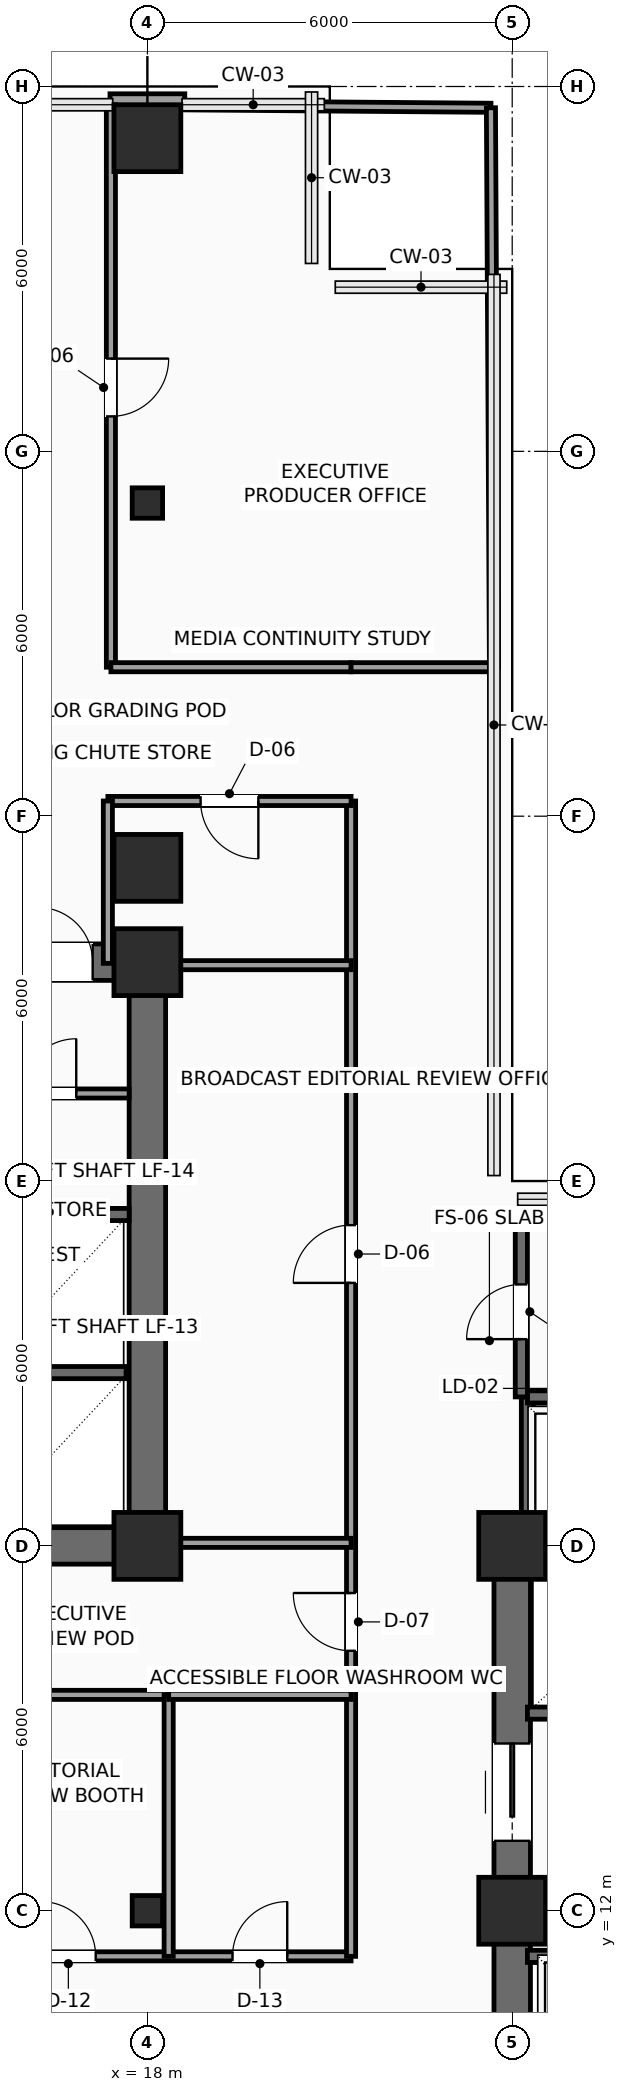
"""IFC4 building model, lengths in metres.
Left out: names, types, materials, properties, quantities, classifications, styles, units other than length and angle.
Written with IfcOpenShell. Run it as: python <this file> out.ifc"""

import sys

from ifc_helpers import new_model, si_unit, direction, frame, frame_2d, origin, origin_2d, place, context, subcontext, project, spatial, rectangle, hollow_rectangle, extrude, element, fill, save


model = new_model("IFC4")
c1 = context("Model", 3, precision=1e-05, world=origin(), true_north=direction((0.0, 1.0)))
c2 = subcontext(c1, "Body", "Model", "MODEL_VIEW")
j1 = project(units=[si_unit("LENGTHUNIT", "METRE"), si_unit("PLANEANGLEUNIT", "RADIAN")], contexts=[c1])
p1 = place(None, origin())
s1 = spatial("IfcSite", under=j1, at=p1, CompositionType="ELEMENT")
p2 = place(p1, origin())
s2 = spatial("IfcBuilding", under=s1, at=p2, CompositionType="ELEMENT")
p3 = place(p2, frame((0.0, 0.0, 156.9)))
s3 = spatial("IfcBuildingStorey", under=s2, at=p3, CompositionType="ELEMENT", Elevation=156.9)
for number, where, z_axis, x_axis in (
    (1, (18.0, 18.0, 0.0), (0.0, 0.0, 1.0), (1.0, 0.0, 0.0)),
    (2, (18.0, 27.6, 0.0), (0.0, 0.0, 1.0), (1.0, 0.0, 0.0)),
    (3, (24.0, 12.0, 0.0), (0.0, 0.0, 1.0), (1.0, 0.0, 0.0)),
    (4, (24.0, 18.0, 0.0), (0.0, 0.0, 1.0), (1.0, 0.0, 0.0)),
):
    element("IfcColumn", number, at=place(p3, frame(where, z_axis=z_axis, x_axis=x_axis)), inside=s3, PredefinedType="COLUMN", context=c2, shape_type="SweptSolid", body=[
        extrude(rectangle(XDim=1.1, YDim=1.1, at=origin_2d()), origin(), (0.0, 0.0, 1.0), 3.75),
    ])
p4 = place(p3, frame((18.0, 12.0, 0.0), z_axis=(0.0, 0.0, 1.0), x_axis=(1.0, 0.0, 0.0)))
e5 = element("IfcColumn", 5, at=p4, inside=s3, PredefinedType="COLUMN", context=c2, shape_type="SweptSolid", body=[
    extrude(hollow_rectangle(XDim=0.5, YDim=0.5, WallThickness=0.025, InnerFilletRadius=0.025, OuterFilletRadius=0.04, at=origin_2d()), origin(), (0.0, 0.0, 1.0), 3.75),
])
p5 = place(p3, frame((18.0, 29.15, 0.0), z_axis=(0.0, 0.0, 1.0), x_axis=(1.0, 0.0, 0.0)))
e6 = element("IfcColumn", 6, at=p5, inside=s3, PredefinedType="COLUMN", context=c2, shape_type="SweptSolid", body=[
    extrude(rectangle(XDim=1.1, YDim=1.1, at=origin_2d()), origin(), (0.0, 0.0, 1.0), 3.75),
])
p6 = place(p3, frame((18.0, 35.15, 0.0), z_axis=(0.0, 0.0, 1.0), x_axis=(1.0, 0.0, 0.0)))
e7 = element("IfcColumn", 7, at=p6, inside=s3, PredefinedType="COLUMN", context=c2, shape_type="SweptSolid", body=[
    extrude(hollow_rectangle(XDim=0.5, YDim=0.5, WallThickness=0.025, InnerFilletRadius=0.025, OuterFilletRadius=0.04, at=origin_2d()), origin(), (0.0, 0.0, 1.0), 3.75),
])
p7 = place(p3, frame((18.0, 41.15, 0.0), z_axis=(0.0, 0.0, 1.0), x_axis=(1.0, 0.0, 0.0)))
e8 = element("IfcColumn", 8, at=p7, inside=s3, PredefinedType="COLUMN", context=c2, shape_type="SweptSolid", body=[
    extrude(rectangle(XDim=1.1, YDim=1.1, at=origin_2d()), origin(), (0.0, 0.0, 1.0), 3.75),
])
p8 = place(p3, frame((17.385, 41.76, 0.0), z_axis=(0.0, 0.0, 1.0), x_axis=(1.0, 0.0, 0.0)))
e9 = element("IfcWall", 9, at=p8, inside=s3, PredefinedType="SOLIDWALL", context=c2, shape_type="SweptSolid", body=[
    extrude(rectangle(XDim=1.23, YDim=0.24, at=frame_2d((0.615, 0.0))), origin(), (0.0, 0.0, 1.0), 3.525),
])
p9 = place(p3, frame((6.0, 18.0, 0.0), z_axis=(0.0, 0.0, 1.0), x_axis=(1.0, 0.0, 0.0)))
e10 = element("IfcWall", 10, at=p9, inside=s3, PredefinedType="SHEAR", context=c2, shape_type="SweptSolid", body=[
    extrude(rectangle(XDim=12.0, YDim=0.6, at=frame_2d((6.0, 0.0))), origin(), (0.0, 0.0, 1.0), 3.525),
])
p10 = place(p9, frame((7.15, 0.0, 0.0)))
e11 = element("IfcOpeningElement", 11, at=p10, cuts=e10, PredefinedType="OPENING", context=c2, shape_type="SweptSolid", body=[
    extrude(rectangle(XDim=1.6, YDim=2.3, at=frame_2d((0.8, 1.15))), frame((0.0, 0.31, 0.0), z_axis=(0.0, -1.0, 0.0), x_axis=(1.0, 0.0, 0.0)), (0.0, 0.0, 1.0), 0.62),
])
p11 = place(p3, frame((6.0, 27.6, 0.0), z_axis=(0.0, 0.0, 1.0), x_axis=(1.0, 0.0, 0.0)))
e12 = element("IfcWall", 12, at=p11, inside=s3, PredefinedType="SHEAR", context=c2, shape_type="SweptSolid", body=[
    extrude(rectangle(XDim=12.0, YDim=0.6, at=frame_2d((6.0, 0.0))), origin(), (0.0, 0.0, 1.0), 3.525),
])
p12 = place(p11, frame((10.2, 0.0, 0.0)))
e13 = element("IfcOpeningElement", 13, at=p12, cuts=e12, PredefinedType="OPENING", context=c2, shape_type="SweptSolid", body=[
    extrude(rectangle(XDim=0.9, YDim=2.15, at=frame_2d((0.45, 1.075))), frame((0.0, 0.31, 0.0), z_axis=(0.0, -1.0, 0.0), x_axis=(1.0, 0.0, 0.0)), (0.0, 0.0, 1.0), 0.62),
])
for number, where, z_axis, x_axis in (
    (14, (18.0, 18.0, 0.0), (0.0, 0.0, 1.0), (0.0, 1.0, 0.0)),
    (15, (24.0, 18.0, 0.0), (0.0, 0.0, 1.0), (1.0, 0.0, 0.0)),
):
    element("IfcWall", number, at=place(p3, frame(where, z_axis=z_axis, x_axis=x_axis)), inside=s3, PredefinedType="SHEAR", context=c2, shape_type="SweptSolid", body=[
        extrude(rectangle(XDim=9.6, YDim=0.6, at=frame_2d((4.8, 0.0))), origin(), (0.0, 0.0, 1.0), 3.525),
    ])
p13 = place(p3, frame((24.0, 6.0, 0.0), z_axis=(0.0, 0.0, 1.0), x_axis=(0.0, 1.0, 0.0)))
e16 = element("IfcWall", 16, at=p13, inside=s3, PredefinedType="SHEAR", context=c2, shape_type="SweptSolid", body=[
    extrude(rectangle(XDim=12.0, YDim=0.6, at=frame_2d((6.0, 0.0))), origin(), (0.0, 0.0, 1.0), 3.525),
])
p14 = place(p13, frame((7.15, 0.0, 0.0)))
e17 = element("IfcOpeningElement", 17, at=p14, cuts=e16, PredefinedType="OPENING", context=c2, shape_type="SweptSolid", body=[
    extrude(rectangle(XDim=1.6, YDim=2.3, at=frame_2d((0.8, 1.15))), frame((0.0, 0.31, 0.0), z_axis=(0.0, -1.0, 0.0), x_axis=(1.0, 0.0, 0.0)), (0.0, 0.0, 1.0), 0.62),
])
p15 = place(p3, frame((24.25, 11.25, 0.0), z_axis=(0.0, 0.0, 1.0), x_axis=(1.0, 0.0, 0.0)))
e18 = element("IfcWall", 18, at=p15, inside=s3, PredefinedType="SHEAR", context=c2, shape_type="SweptSolid", body=[
    extrude(rectangle(XDim=2.17, YDim=0.2, at=frame_2d((1.085, 0.0))), origin(), (0.0, 0.0, 1.0), 3.525),
])
p16 = place(p3, frame((15.25, 20.85, 0.0), z_axis=(0.0, 0.0, 1.0), x_axis=(1.0, 0.0, 0.0)))
e19 = element("IfcWall", 19, at=p16, inside=s3, PredefinedType="SHEAR", context=c2, shape_type="SweptSolid", body=[
    extrude(rectangle(XDim=2.4, YDim=0.2, at=frame_2d((1.2, 0.0))), origin(), (0.0, 0.0, 1.0), 3.525),
])
p17 = place(p3, frame((15.25, 23.45, 0.0), z_axis=(0.0, 0.0, 1.0), x_axis=(1.0, 0.0, 0.0)))
e20 = element("IfcWall", 20, at=p17, inside=s3, PredefinedType="SHEAR", context=c2, shape_type="SweptSolid", body=[
    extrude(rectangle(XDim=2.45, YDim=0.2, at=frame_2d((1.225, 0.0))), origin(), (0.0, 0.0, 1.0), 3.525),
])
p18 = place(p3, frame((24.25, 15.25, 0.0), z_axis=(0.0, 0.0, 1.0), x_axis=(1.0, 0.0, 0.0)))
e21 = element("IfcWall", 21, at=p18, inside=s3, PredefinedType="SHEAR", context=c2, shape_type="SweptSolid", body=[
    extrude(rectangle(XDim=5.2, YDim=0.2, at=frame_2d((2.6, 0.0))), origin(), (0.0, 0.0, 1.0), 3.525),
])
p19 = place(p3, frame((15.28, 25.44, 0.0), z_axis=(0.0, 0.0, 1.0), x_axis=(1.0, 0.0, 0.0)))
e22 = element("IfcWall", 22, at=p19, inside=s3, PredefinedType="PARTITIONING", context=c2, shape_type="SweptSolid", body=[
    extrude(rectangle(XDim=2.42, YDim=0.15, at=frame_2d((1.21, 0.0))), origin(), (0.0, 0.0, 1.0), 3.525),
])
p20 = place(p19, frame((0.65, 0.0, 0.0)))
e23 = element("IfcOpeningElement", 23, at=p20, cuts=e22, PredefinedType="OPENING", context=c2, shape_type="SweptSolid", body=[
    extrude(rectangle(XDim=0.9, YDim=2.15, at=frame_2d((0.45, 1.075))), frame((0.0, 0.085, 0.0), z_axis=(0.0, -1.0, 0.0), x_axis=(1.0, 0.0, 0.0)), (0.0, 0.0, 1.0), 0.17),
])
p21 = place(p3, frame((24.25, 18.1, 0.0), z_axis=(0.0, 0.0, 1.0), x_axis=(0.0, 1.0, 0.0)))
e24 = element("IfcWall", 24, at=p21, inside=s3, PredefinedType="SHEAR", context=c2, shape_type="SweptSolid", body=[
    extrude(rectangle(XDim=2.35, YDim=0.2, at=frame_2d((1.175, 0.0))), origin(), (0.0, 0.0, 1.0), 3.525),
])
p22 = place(p3, frame((24.25, 20.45, 0.0), z_axis=(0.0, 0.0, 1.0), x_axis=(1.0, 0.0, 0.0)))
e25 = element("IfcWall", 25, at=p22, inside=s3, PredefinedType="SHEAR", context=c2, shape_type="SweptSolid", body=[
    extrude(rectangle(XDim=9.05, YDim=0.2, at=frame_2d((4.525, 0.0))), origin(), (0.0, 0.0, 1.0), 3.525),
])
p23 = place(p22, frame((0.4, 0.0, 0.0)))
e26 = element("IfcOpeningElement", 26, at=p23, cuts=e25, PredefinedType="OPENING", context=c2, shape_type="SweptSolid", body=[
    extrude(rectangle(XDim=1.2, YDim=2.2, at=frame_2d((0.6, 1.1))), frame((0.0, 0.11, 0.0), z_axis=(0.0, -1.0, 0.0), x_axis=(1.0, 0.0, 0.0)), (0.0, 0.0, 1.0), 0.22),
])
p24 = place(p22, frame((2.65, 0.0, 0.0)))
e27 = element("IfcOpeningElement", 27, at=p24, cuts=e25, PredefinedType="OPENING", context=c2, shape_type="SweptSolid", body=[
    extrude(rectangle(XDim=1.2, YDim=2.2, at=frame_2d((0.6, 1.1))), frame((0.0, 0.11, 0.0), z_axis=(0.0, -1.0, 0.0), x_axis=(1.0, 0.0, 0.0)), (0.0, 0.0, 1.0), 0.22),
])
p25 = place(p22, frame((4.9, 0.0, 0.0)))
e28 = element("IfcOpeningElement", 28, at=p25, cuts=e25, PredefinedType="OPENING", context=c2, shape_type="SweptSolid", body=[
    extrude(rectangle(XDim=1.2, YDim=2.2, at=frame_2d((0.6, 1.1))), frame((0.0, 0.11, 0.0), z_axis=(0.0, -1.0, 0.0), x_axis=(1.0, 0.0, 0.0)), (0.0, 0.0, 1.0), 0.22),
])
p26 = place(p22, frame((7.15, 0.0, 0.0)))
e29 = element("IfcOpeningElement", 29, at=p26, cuts=e25, PredefinedType="OPENING", context=c2, shape_type="SweptSolid", body=[
    extrude(rectangle(XDim=1.2, YDim=2.2, at=frame_2d((0.6, 1.1))), frame((0.0, 0.11, 0.0), z_axis=(0.0, -1.0, 0.0), x_axis=(1.0, 0.0, 0.0)), (0.0, 0.0, 1.0), 0.22),
])
p27 = place(p3, frame((24.15, 23.5, 0.0), z_axis=(0.0, 0.0, 1.0), x_axis=(1.0, 0.0, 0.0)))
e30 = element("IfcWall", 30, at=p27, inside=s3, PredefinedType="SHEAR", context=c2, shape_type="SweptSolid", body=[
    extrude(rectangle(XDim=9.15, YDim=0.2, at=frame_2d((4.575, 0.0))), origin(), (0.0, 0.0, 1.0), 3.525),
])
p28 = place(p3, frame((24.15, 20.45, 0.0), z_axis=(0.0, 0.0, 1.0), x_axis=(0.0, 1.0, 0.0)))
e31 = element("IfcWall", 31, at=p28, inside=s3, PredefinedType="SHEAR", context=c2, shape_type="SweptSolid", body=[
    extrude(rectangle(XDim=3.05, YDim=0.2, at=frame_2d((1.525, 0.0))), origin(), (0.0, 0.0, 1.0), 3.525),
])
p29 = place(p28, frame((0.95, 0.0, 0.0)))
e32 = element("IfcOpeningElement", 32, at=p29, cuts=e31, PredefinedType="OPENING", context=c2, shape_type="SweptSolid", body=[
    extrude(rectangle(XDim=0.9, YDim=2.15, at=frame_2d((0.45, 1.075))), frame((0.0, 0.11, 0.0), z_axis=(0.0, -1.0, 0.0), x_axis=(1.0, 0.0, 0.0)), (0.0, 0.0, 1.0), 0.22),
])
p30 = place(p3, frame((10.8, 11.25, 0.0), z_axis=(0.0, 0.0, 1.0), x_axis=(1.0, 0.0, 0.0)))
e33 = element("IfcWall", 33, at=p30, inside=s3, PredefinedType="PARTITIONING", context=c2, shape_type="SweptSolid", body=[
    extrude(rectangle(XDim=10.55, YDim=0.15, at=frame_2d((5.275, 0.0))), origin(), (0.0, 0.0, 1.0), 3.525),
])
p31 = place(p30, frame((1.98, 0.0, 0.0)))
e34 = element("IfcOpeningElement", 34, at=p31, cuts=e33, PredefinedType="OPENING", context=c2, shape_type="SweptSolid", body=[
    extrude(rectangle(XDim=0.95, YDim=2.15, at=frame_2d((0.475, 1.075))), frame((0.0, 0.085, 0.0), z_axis=(0.0, -1.0, 0.0), x_axis=(1.0, 0.0, 0.0)), (0.0, 0.0, 1.0), 0.17),
])
p32 = place(p30, frame((5.45, 0.0, 0.0)))
e35 = element("IfcOpeningElement", 35, at=p32, cuts=e33, PredefinedType="OPENING", context=c2, shape_type="SweptSolid", body=[
    extrude(rectangle(XDim=0.9, YDim=2.1, at=frame_2d((0.45, 1.05))), frame((0.0, 0.085, 0.0), z_axis=(0.0, -1.0, 0.0), x_axis=(1.0, 0.0, 0.0)), (0.0, 0.0, 1.0), 0.17),
])
p33 = place(p30, frame((8.6, 0.0, 0.0)))
e36 = element("IfcOpeningElement", 36, at=p33, cuts=e33, PredefinedType="OPENING", context=c2, shape_type="SweptSolid", body=[
    extrude(rectangle(XDim=0.9, YDim=2.1, at=frame_2d((0.45, 1.05))), frame((0.0, 0.085, 0.0), z_axis=(0.0, -1.0, 0.0), x_axis=(1.0, 0.0, 0.0)), (0.0, 0.0, 1.0), 0.17),
])
p34 = place(p3, frame((21.35, 11.25, 0.0), z_axis=(0.0, 0.0, 1.0), x_axis=(0.0, 1.0, 0.0)))
e37 = element("IfcWall", 37, at=p34, inside=s3, PredefinedType="PARTITIONING", context=c2, shape_type="SweptSolid", body=[
    extrude(rectangle(XDim=19.0, YDim=0.15, at=frame_2d((9.5, 0.0))), origin(), (0.0, 0.0, 1.0), 3.525),
])
p35 = place(p34, frame((11.075, 0.0, 0.0)))
e38 = element("IfcOpeningElement", 38, at=p35, cuts=e37, PredefinedType="OPENING", context=c2, shape_type="SweptSolid", body=[
    extrude(rectangle(XDim=0.95, YDim=2.15, at=frame_2d((0.475, 1.075))), frame((0.0, 0.085, 0.0), z_axis=(0.0, -1.0, 0.0), x_axis=(1.0, 0.0, 0.0)), (0.0, 0.0, 1.0), 0.17),
])
p36 = place(p34, frame((5.025, 0.0, 0.0)))
e39 = element("IfcOpeningElement", 39, at=p36, cuts=e37, PredefinedType="OPENING", context=c2, shape_type="SweptSolid", body=[
    extrude(rectangle(XDim=0.95, YDim=2.15, at=frame_2d((0.475, 1.075))), frame((0.0, 0.085, 0.0), z_axis=(0.0, -1.0, 0.0), x_axis=(1.0, 0.0, 0.0)), (0.0, 0.0, 1.0), 0.17),
])
p37 = place(p3, frame((21.35, 30.25, 0.0), z_axis=(0.0, 0.0, 1.0), x_axis=(-1.0, 0.0, 0.0)))
e40 = element("IfcWall", 40, at=p37, inside=s3, PredefinedType="PARTITIONING", context=c2, shape_type="SweptSolid", body=[
    extrude(rectangle(XDim=4.0, YDim=0.15, at=frame_2d((2.0, 0.0))), origin(), (0.0, 0.0, 1.0), 3.525),
])
p38 = place(p37, frame((1.525, 0.0, 0.0)))
e41 = element("IfcOpeningElement", 41, at=p38, cuts=e40, PredefinedType="OPENING", context=c2, shape_type="SweptSolid", body=[
    extrude(rectangle(XDim=0.95, YDim=2.15, at=frame_2d((0.475, 1.075))), frame((0.0, 0.085, 0.0), z_axis=(0.0, -1.0, 0.0), x_axis=(1.0, 0.0, 0.0)), (0.0, 0.0, 1.0), 0.17),
])
p39 = place(p3, frame((17.35, 30.25, 0.0), z_axis=(0.0, 0.0, 1.0), x_axis=(0.0, -1.0, 0.0)))
e42 = element("IfcWall", 42, at=p39, inside=s3, PredefinedType="PARTITIONING", context=c2, shape_type="SweptSolid", body=[
    extrude(rectangle(XDim=2.67, YDim=0.15, at=frame_2d((1.335, 0.0))), origin(), (0.0, 0.0, 1.0), 3.525),
])
p40 = place(p3, frame((17.4, 41.7, 0.0), z_axis=(0.0, 0.0, 1.0), x_axis=(0.0, -1.0, 0.0)))
e43 = element("IfcWall", 43, at=p40, inside=s3, PredefinedType="PARTITIONING", context=c2, shape_type="SweptSolid", body=[
    extrude(rectangle(XDim=9.25, YDim=0.15, at=frame_2d((4.625, 0.0))), origin(), (0.0, 0.0, 1.0), 3.525),
])
p41 = place(p40, frame((4.175, 0.0, 0.0)))
e44 = element("IfcOpeningElement", 44, at=p41, cuts=e43, PredefinedType="OPENING", context=c2, shape_type="SweptSolid", body=[
    extrude(rectangle(XDim=0.95, YDim=2.15, at=frame_2d((0.475, 1.075))), frame((0.0, 0.085, 0.0), z_axis=(0.0, -1.0, 0.0), x_axis=(1.0, 0.0, 0.0)), (0.0, 0.0, 1.0), 0.17),
])
p42 = place(p3, frame((17.4, 32.45, 0.0), z_axis=(0.0, 0.0, 1.0), x_axis=(1.0, 0.0, 0.0)))
e45 = element("IfcWall", 45, at=p42, inside=s3, PredefinedType="PARTITIONING", context=c2, shape_type="SweptSolid", body=[
    extrude(rectangle(XDim=3.95, YDim=0.15, at=frame_2d((1.975, 0.0))), origin(), (0.0, 0.0, 1.0), 3.525),
])
p43 = place(p3, frame((21.35, 32.45, 0.0), z_axis=(0.0, 0.0, 1.0), x_axis=(1.0, 0.0, 0.0)))
e46 = element("IfcWall", 46, at=p43, inside=s3, PredefinedType="PARTITIONING", context=c2, shape_type="SweptSolid", body=[
    extrude(rectangle(XDim=2.35, YDim=0.15, at=frame_2d((1.175, 0.0))), origin(), (0.0, 0.0, 1.0), 3.525),
])
p44 = place(p3, frame((15.2, 15.55, 0.0), z_axis=(0.0, 0.0, 1.0), x_axis=(1.0, 0.0, 0.0)))
e47 = element("IfcWall", 47, at=p44, inside=s3, PredefinedType="PARTITIONING", context=c2, shape_type="SweptSolid", body=[
    extrude(rectangle(XDim=3.15, YDim=0.15, at=frame_2d((1.575, 0.0))), origin(), (0.0, 0.0, 1.0), 3.525),
])
p45 = place(p3, frame((18.35, 11.25, 0.0), z_axis=(0.0, 0.0, 1.0), x_axis=(0.0, 1.0, 0.0)))
e48 = element("IfcWall", 48, at=p45, inside=s3, PredefinedType="PARTITIONING", context=c2, shape_type="SweptSolid", body=[
    extrude(rectangle(XDim=4.3, YDim=0.15, at=frame_2d((2.15, 0.0))), origin(), (0.0, 0.0, 1.0), 3.525),
])
p46 = place(p3, frame((18.35, 15.55, 0.0), z_axis=(0.0, 0.0, 1.0), x_axis=(1.0, 0.0, 0.0)))
e49 = element("IfcWall", 49, at=p46, inside=s3, PredefinedType="PARTITIONING", context=c2, shape_type="SweptSolid", body=[
    extrude(rectangle(XDim=3.0, YDim=0.15, at=frame_2d((1.5, 0.0))), origin(), (0.0, 0.0, 1.0), 3.525),
])
p47 = place(p3, frame((18.1, 18.05, 0.0), z_axis=(0.0, 0.0, 1.0), x_axis=(1.0, 0.0, 0.0)))
e50 = element("IfcWall", 50, at=p47, inside=s3, PredefinedType="PARTITIONING", context=c2, shape_type="SweptSolid", body=[
    extrude(rectangle(XDim=3.25, YDim=0.15, at=frame_2d((1.625, 0.0))), origin(), (0.0, 0.0, 1.0), 3.017),
])
p48 = place(p3, frame((18.1, 27.55, 0.0), z_axis=(0.0, 0.0, 1.0), x_axis=(1.0, 0.0, 0.0)))
e51 = element("IfcWall", 51, at=p48, inside=s3, PredefinedType="PARTITIONING", context=c2, shape_type="SweptSolid", body=[
    extrude(rectangle(XDim=3.25, YDim=0.15, at=frame_2d((1.625, 0.0))), origin(), (0.0, 0.0, 1.0), 3.525),
])
p49 = place(p3, frame((18.615, 41.69, 0.0), z_axis=(0.0, 0.0, 1.0), x_axis=(0.99996799533, -0.008000519771, 0.0)))
e52 = element("IfcWall", 52, at=p49, inside=s3, PredefinedType="PARTITIONING", context=c2, shape_type="SweptSolid", body=[
    extrude(rectangle(XDim=5.035, YDim=0.15, at=frame_2d((2.518, 0.0))), origin(), (0.0, 0.0, 1.0), 3.525),
])
p50 = place(p3, frame((23.7, 32.45, 0.0), z_axis=(0.0, 0.0, 1.0), x_axis=(-0.005440038388, 0.999985202882, 0.0)))
e53 = element("IfcWall", 53, at=p50, inside=s3, PredefinedType="PARTITIONING", context=c2, shape_type="SweptSolid", body=[
    extrude(rectangle(XDim=9.2, YDim=0.15, at=frame_2d((4.6, 0.0))), origin(), (0.0, 0.0, 1.0), 3.525),
])
p51 = place(p12, origin())
e54 = element("IfcDoor", 54, at=p51, inside=s3, OperationType="SINGLE_SWING_LEFT", PredefinedType="DOOR", context=c2, shape_type="SweptSolid", body=[
    extrude(rectangle(XDim=0.9, YDim=2.15, at=frame_2d((0.45, 1.075))), frame((0.0, 0.025, 0.0), z_axis=(0.0, -1.0, 0.0), x_axis=(1.0, 0.0, 0.0)), (0.0, 0.0, 1.0), 0.05),
])
fill(e13, e54)
p52 = place(p14, origin())
e55 = element("IfcDoor", 55, at=p52, inside=s3, OperationType="DOUBLE_DOOR_SLIDING", PredefinedType="DOOR", context=c2, shape_type="SweptSolid", body=[
    extrude(rectangle(XDim=1.6, YDim=2.3, at=frame_2d((0.8, 1.15))), frame((0.0, 0.025, 0.0), z_axis=(0.0, -1.0, 0.0), x_axis=(1.0, 0.0, 0.0)), (0.0, 0.0, 1.0), 0.05),
])
fill(e17, e55)
p53 = place(p20, origin())
e56 = element("IfcDoor", 56, at=p53, inside=s3, OperationType="SINGLE_SWING_RIGHT", PredefinedType="DOOR", context=c2, shape_type="SweptSolid", body=[
    extrude(rectangle(XDim=0.9, YDim=2.15, at=frame_2d((0.45, 1.075))), frame((0.0, 0.025, 0.0), z_axis=(0.0, -1.0, 0.0), x_axis=(1.0, 0.0, 0.0)), (0.0, 0.0, 1.0), 0.05),
])
fill(e23, e56)
p54 = place(p29, origin())
e57 = element("IfcDoor", 57, at=p54, inside=s3, OperationType="SINGLE_SWING_LEFT", PredefinedType="DOOR", context=c2, shape_type="SweptSolid", body=[
    extrude(rectangle(XDim=0.9, YDim=2.15, at=frame_2d((0.45, 1.075))), frame((0.0, 0.025, 0.0), z_axis=(0.0, -1.0, 0.0), x_axis=(1.0, 0.0, 0.0)), (0.0, 0.0, 1.0), 0.05),
])
fill(e32, e57)
p55 = place(p32, origin())
e58 = element("IfcDoor", 58, at=p55, inside=s3, OperationType="SINGLE_SWING_LEFT", PredefinedType="DOOR", context=c2, shape_type="SweptSolid", body=[
    extrude(rectangle(XDim=0.9, YDim=2.1, at=frame_2d((0.45, 1.05))), frame((0.0, 0.025, 0.0), z_axis=(0.0, -1.0, 0.0), x_axis=(1.0, 0.0, 0.0)), (0.0, 0.0, 1.0), 0.05),
])
fill(e35, e58)
p56 = place(p33, origin())
e59 = element("IfcDoor", 59, at=p56, inside=s3, OperationType="SINGLE_SWING_RIGHT", PredefinedType="DOOR", context=c2, shape_type="SweptSolid", body=[
    extrude(rectangle(XDim=0.9, YDim=2.1, at=frame_2d((0.45, 1.05))), frame((0.0, 0.025, 0.0), z_axis=(0.0, -1.0, 0.0), x_axis=(1.0, 0.0, 0.0)), (0.0, 0.0, 1.0), 0.05),
])
fill(e36, e59)
p57 = place(p35, origin())
e60 = element("IfcDoor", 60, at=p57, inside=s3, OperationType="SINGLE_SWING_LEFT", PredefinedType="DOOR", context=c2, shape_type="SweptSolid", body=[
    extrude(rectangle(XDim=0.95, YDim=2.15, at=frame_2d((0.475, 1.075))), frame((0.0, 0.025, 0.0), z_axis=(0.0, -1.0, 0.0), x_axis=(1.0, 0.0, 0.0)), (0.0, 0.0, 1.0), 0.05),
])
fill(e38, e60)
p58 = place(p36, origin())
e61 = element("IfcDoor", 61, at=p58, inside=s3, OperationType="SINGLE_SWING_RIGHT", PredefinedType="DOOR", context=c2, shape_type="SweptSolid", body=[
    extrude(rectangle(XDim=0.95, YDim=2.15, at=frame_2d((0.475, 1.075))), frame((0.0, 0.025, 0.0), z_axis=(0.0, -1.0, 0.0), x_axis=(1.0, 0.0, 0.0)), (0.0, 0.0, 1.0), 0.05),
])
fill(e39, e61)
p59 = place(p38, origin())
e62 = element("IfcDoor", 62, at=p59, inside=s3, OperationType="SINGLE_SWING_LEFT", PredefinedType="DOOR", context=c2, shape_type="SweptSolid", body=[
    extrude(rectangle(XDim=0.95, YDim=2.15, at=frame_2d((0.475, 1.075))), frame((0.0, 0.025, 0.0), z_axis=(0.0, -1.0, 0.0), x_axis=(1.0, 0.0, 0.0)), (0.0, 0.0, 1.0), 0.05),
])
fill(e41, e62)
p60 = place(p41, origin())
e63 = element("IfcDoor", 63, at=p60, inside=s3, OperationType="SINGLE_SWING_LEFT", PredefinedType="DOOR", context=c2, shape_type="SweptSolid", body=[
    extrude(rectangle(XDim=0.95, YDim=2.15, at=frame_2d((0.475, 1.075))), frame((0.0, 0.025, 0.0), z_axis=(0.0, -1.0, 0.0), x_axis=(1.0, 0.0, 0.0)), (0.0, 0.0, 1.0), 0.05),
])
fill(e44, e63)
save(model, sys.argv[1])
